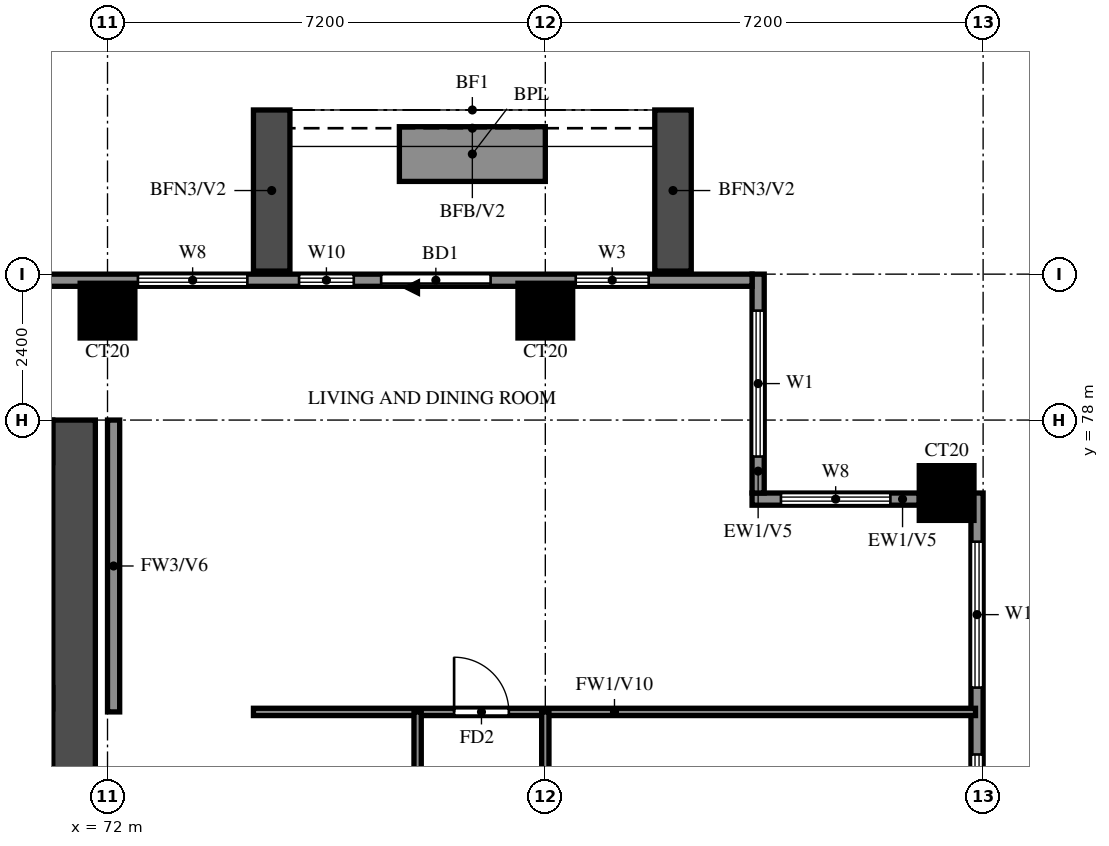
"""IFC4 building model, lengths in metres.
Left out: names, types, materials, properties, quantities, classifications, styles, units other than length and angle.
Written with IfcOpenShell. Run it as: python <this file> out.ifc"""

import sys

from ifc_helpers import new_model, si_unit, direction, frame, frame_2d, origin, origin_2d, place, context, subcontext, project, spatial, rectangle, extrude, source, transform, mapped, element, fill, save


model = new_model("IFC4")
c1 = context("Model", 3, precision=1e-05, world=origin(), true_north=direction((0.0, 1.0)))
c2 = subcontext(c1, "Body", "Model", "MODEL_VIEW")
j1 = project(units=[si_unit("LENGTHUNIT", "METRE"), si_unit("PLANEANGLEUNIT", "RADIAN")], contexts=[c1])
p1 = place(None, origin())
s1 = spatial("IfcSite", under=j1, at=p1, CompositionType="ELEMENT")
p2 = place(p1, origin())
s2 = spatial("IfcBuilding", under=s1, at=p2, CompositionType="ELEMENT")
p3 = place(p2, frame((0.0, 0.0, 134.0)))
s3 = spatial("IfcBuildingStorey", under=s2, at=p3, CompositionType="ELEMENT", Elevation=134.0)
m1 = source(origin(), c2, "Body", "SweptSolid", [
    extrude(rectangle(XDim=0.9, YDim=0.9, at=origin_2d()), origin(), (0.0, 0.0, 1.0), 3.15),
])
for number, where, z_axis, x_axis in (
    (1, (85.8, 76.8, 0.0), (0.0, 0.0, 1.0), (1.0, 0.0, 0.0)),
    (2, (72.0, 79.8, 0.0), (0.0, 0.0, 1.0), (1.0, 0.0, 0.0)),
    (3, (79.2, 79.8, 0.0), (0.0, 0.0, 1.0), (1.0, 0.0, 0.0)),
):
    element("IfcColumn", number, at=place(p3, frame(where, z_axis=z_axis, x_axis=x_axis)), inside=s3, PredefinedType="COLUMN", context=c2, shape_type="MappedRepresentation", body=[
        mapped(m1, transform((0.0, 0.0, 0.0))),
    ])
p4 = place(p3, frame((71.45, 66.1, 0.0), z_axis=(0.0, 0.0, 1.0), x_axis=(0.0, 1.0, 0.0)))
e4 = element("IfcWall", 4, at=p4, inside=s3, PredefinedType="SHEAR", context=c2, shape_type="SweptSolid", body=[
    extrude(rectangle(XDim=11.9, YDim=0.7, at=frame_2d((5.95, 0.0))), origin(), (0.0, 0.0, 1.0), 3.15),
])
p5 = place(p3, frame((29.7, 77.65, 0.0), z_axis=(0.0, 0.0, 1.0), x_axis=(1.0, 0.0, 0.0)))
e5 = element("IfcWall", 5, at=p5, inside=s3, PredefinedType="SHEAR", context=c2, shape_type="SweptSolid", body=[
    extrude(rectangle(XDim=41.4, YDim=0.7, at=frame_2d((20.7, 0.0))), origin(), (0.0, 0.0, 1.0), 3.15),
])
p6 = place(p3, frame((86.3, 69.6, 0.0), z_axis=(0.0, 0.0, 1.0), x_axis=(0.0, 1.0, 0.0)))
e6 = element("IfcWall", 6, at=p6, inside=s3, PredefinedType="SOLIDWALL", context=c2, shape_type="SweptSolid", body=[
    extrude(rectangle(XDim=7.2, YDim=0.2, at=frame_2d((3.6, 0.0))), origin(), (0.0, 0.0, 1.0), 3.15),
])
p7 = place(p6, frame((1.1, 0.0, 0.6)))
e7 = element("IfcOpeningElement", 7, at=p7, cuts=e6, PredefinedType="OPENING", context=c2, shape_type="SweptSolid", body=[
    extrude(rectangle(XDim=1.8, YDim=2.4, at=frame_2d((0.9, 1.2))), frame((0.0, 0.11, 0.0), z_axis=(0.0, -1.0, 0.0), x_axis=(1.0, 0.0, 0.0)), (0.0, 0.0, 1.0), 0.22),
])
p8 = place(p6, frame((4.0, 0.0, 0.6)))
e8 = element("IfcOpeningElement", 8, at=p8, cuts=e6, PredefinedType="OPENING", context=c2, shape_type="SweptSolid", body=[
    extrude(rectangle(XDim=2.4, YDim=2.4, at=frame_2d((1.2, 1.2))), frame((0.0, 0.11, 0.0), z_axis=(0.0, -1.0, 0.0), x_axis=(1.0, 0.0, 0.0)), (0.0, 0.0, 1.0), 0.22),
])
p9 = place(p3, frame((85.35, 76.7, 0.0), z_axis=(0.0, 0.0, 1.0), x_axis=(-1.0, 0.0, 0.0)))
e9 = element("IfcWall", 9, at=p9, inside=s3, PredefinedType="SOLIDWALL", context=c2, shape_type="SweptSolid", body=[
    extrude(rectangle(XDim=2.75, YDim=0.2, at=frame_2d((1.375, 0.0))), origin(), (0.0, 0.0, 1.0), 3.15),
])
p10 = place(p9, frame((0.475, 0.0, 0.6)))
e10 = element("IfcOpeningElement", 10, at=p10, cuts=e9, PredefinedType="OPENING", context=c2, shape_type="SweptSolid", body=[
    extrude(rectangle(XDim=1.8, YDim=2.4, at=frame_2d((0.9, 1.2))), frame((0.0, 0.11, 0.0), z_axis=(0.0, -1.0, 0.0), x_axis=(1.0, 0.0, 0.0)), (0.0, 0.0, 1.0), 0.22),
])
p11 = place(p3, frame((82.7, 76.8, 0.0), z_axis=(0.0, 0.0, 1.0), x_axis=(0.0, 1.0, 0.0)))
e11 = element("IfcWall", 11, at=p11, inside=s3, PredefinedType="SOLIDWALL", context=c2, shape_type="SweptSolid", body=[
    extrude(rectangle(XDim=3.6, YDim=0.2, at=frame_2d((1.8, 0.0))), origin(), (0.0, 0.0, 1.0), 3.15),
])
p12 = place(p11, frame((0.6, 0.0, 0.6)))
e12 = element("IfcOpeningElement", 12, at=p12, cuts=e11, PredefinedType="OPENING", context=c2, shape_type="SweptSolid", body=[
    extrude(rectangle(XDim=2.4, YDim=2.4, at=frame_2d((1.2, 1.2))), frame((0.0, 0.11, 0.0), z_axis=(0.0, -1.0, 0.0), x_axis=(1.0, 0.0, 0.0)), (0.0, 0.0, 1.0), 0.22),
])
p13 = place(p3, frame((82.6, 80.3, 0.0), z_axis=(0.0, 0.0, 1.0), x_axis=(-1.0, 0.0, 0.0)))
e13 = element("IfcWall", 13, at=p13, inside=s3, PredefinedType="SOLIDWALL", context=c2, shape_type="SweptSolid", body=[
    extrude(rectangle(XDim=64.6, YDim=0.2, at=frame_2d((32.3, 0.0))), origin(), (0.0, 0.0, 1.0), 3.15),
])
p14 = place(p13, frame((4.3, 0.0, 0.0)))
e14 = element("IfcOpeningElement", 14, at=p14, cuts=e13, PredefinedType="OPENING", context=c2, shape_type="SweptSolid", body=[
    extrude(rectangle(XDim=1.8, YDim=2.4, at=frame_2d((0.9, 1.2))), frame((0.0, 0.11, 0.0), z_axis=(0.0, -1.0, 0.0), x_axis=(1.0, 0.0, 0.0)), (0.0, 0.0, 1.0), 0.22),
])
p15 = place(p13, frame((54.767, 0.0, 0.6)))
e15 = element("IfcOpeningElement", 15, at=p15, cuts=e13, PredefinedType="OPENING", context=c2, shape_type="SweptSolid", body=[
    extrude(rectangle(XDim=2.4, YDim=2.4, at=frame_2d((1.2, 1.2))), frame((0.0, 0.11, 0.0), z_axis=(0.0, -1.0, 0.0), x_axis=(1.0, 0.0, 0.0)), (0.0, 0.0, 1.0), 0.22),
])
p16 = place(p13, frame((57.633, 0.0, 0.6)))
e16 = element("IfcOpeningElement", 16, at=p16, cuts=e13, PredefinedType="OPENING", context=c2, shape_type="SweptSolid", body=[
    extrude(rectangle(XDim=2.4, YDim=2.4, at=frame_2d((1.2, 1.2))), frame((0.0, 0.11, 0.0), z_axis=(0.0, -1.0, 0.0), x_axis=(1.0, 0.0, 0.0)), (0.0, 0.0, 1.0), 0.22),
])
p17 = place(p13, frame((62.0, 0.0, 0.6)))
e17 = element("IfcOpeningElement", 17, at=p17, cuts=e13, PredefinedType="OPENING", context=c2, shape_type="SweptSolid", body=[
    extrude(rectangle(XDim=1.8, YDim=2.4, at=frame_2d((0.9, 1.2))), frame((0.0, 0.11, 0.0), z_axis=(0.0, -1.0, 0.0), x_axis=(1.0, 0.0, 0.0)), (0.0, 0.0, 1.0), 0.22),
])
p18 = place(p13, frame((1.7, 0.0, 0.6)))
e18 = element("IfcOpeningElement", 18, at=p18, cuts=e13, PredefinedType="OPENING", context=c2, shape_type="SweptSolid", body=[
    extrude(rectangle(XDim=1.2, YDim=2.4, at=frame_2d((0.6, 1.2))), frame((0.0, 0.11, 0.0), z_axis=(0.0, -1.0, 0.0), x_axis=(1.0, 0.0, 0.0)), (0.0, 0.0, 1.0), 0.22),
])
p19 = place(p13, frame((6.55, 0.0, 0.6)))
e19 = element("IfcOpeningElement", 19, at=p19, cuts=e13, PredefinedType="OPENING", context=c2, shape_type="SweptSolid", body=[
    extrude(rectangle(XDim=0.9, YDim=2.4, at=frame_2d((0.45, 1.2))), frame((0.0, 0.11, 0.0), z_axis=(0.0, -1.0, 0.0), x_axis=(1.0, 0.0, 0.0)), (0.0, 0.0, 1.0), 0.22),
])
p20 = place(p13, frame((8.3, 0.0, 0.6)))
e20 = element("IfcOpeningElement", 20, at=p20, cuts=e13, PredefinedType="OPENING", context=c2, shape_type="SweptSolid", body=[
    extrude(rectangle(XDim=1.8, YDim=2.4, at=frame_2d((0.9, 1.2))), frame((0.0, 0.11, 0.0), z_axis=(0.0, -1.0, 0.0), x_axis=(1.0, 0.0, 0.0)), (0.0, 0.0, 1.0), 0.22),
])
for number, where, z_axis, x_axis in (
    (21, (81.3, 80.45, 0.0), (0.0, 0.0, 1.0), (0.0, 1.0, 0.0)),
    (22, (74.7, 80.45, 0.0), (0.0, 0.0, 1.0), (0.0, 1.0, 0.0)),
):
    element("IfcWall", number, at=place(p3, frame(where, z_axis=z_axis, x_axis=x_axis)), inside=s3, PredefinedType="SOLIDWALL", context=c2, shape_type="SweptSolid", body=[
        extrude(rectangle(XDim=2.65, YDim=0.6, at=frame_2d((1.325, 0.0))), origin(), (0.0, 0.0, 1.0), 2.8),
    ])
p21 = place(p3, frame((79.2, 82.375, 0.0), z_axis=(0.0, 0.0, 1.0), x_axis=(-1.0, 0.0, 0.0)))
e23 = element("IfcWall", 23, at=p21, inside=s3, PredefinedType="SOLIDWALL", context=c2, shape_type="SweptSolid", body=[
    extrude(rectangle(XDim=2.4, YDim=0.9, at=frame_2d((1.2, 0.0))), origin(), (0.0, 0.0, 1.0), 0.9),
])
p22 = place(p3, frame((72.1, 73.2, 0.0), z_axis=(0.0, 0.0, 1.0), x_axis=(0.0, 1.0, 0.0)))
e24 = element("IfcWall", 24, at=p22, inside=s3, PredefinedType="SOLIDWALL", context=c2, shape_type="SweptSolid", body=[
    extrude(rectangle(XDim=4.8, YDim=0.2, at=frame_2d((2.4, 0.0))), origin(), (0.0, 0.0, 1.0), 3.15),
])
p23 = place(p3, frame((74.4, 73.2, 0.0), z_axis=(0.0, 0.0, 1.0), x_axis=(1.0, 0.0, 0.0)))
e25 = element("IfcWall", 25, at=p23, inside=s3, PredefinedType="PARTITIONING", context=c2, shape_type="SweptSolid", body=[
    extrude(rectangle(XDim=11.875, YDim=0.12, at=frame_2d((5.938, 0.0))), origin(), (0.0, 0.0, 1.0), 2.25),
])
p24 = place(p23, frame((3.3, 0.0, 0.0)))
e26 = element("IfcOpeningElement", 26, at=p24, cuts=e25, PredefinedType="OPENING", context=c2, shape_type="SweptSolid", body=[
    extrude(rectangle(XDim=0.9, YDim=2.1, at=frame_2d((0.45, 1.05))), frame((0.0, 0.07, 0.0), z_axis=(0.0, -1.0, 0.0), x_axis=(1.0, 0.0, 0.0)), (0.0, 0.0, 1.0), 0.14),
])
p25 = place(p3, frame((77.1, 64.8, 0.0), z_axis=(0.0, 0.0, 1.0), x_axis=(0.0, 1.0, 0.0)))
e27 = element("IfcWall", 27, at=p25, inside=s3, PredefinedType="PARTITIONING", context=c2, shape_type="SweptSolid", body=[
    extrude(rectangle(XDim=8.4, YDim=0.12, at=frame_2d((4.2, 0.0))), origin(), (0.0, 0.0, 1.0), 3.15),
])
p26 = place(p25, frame((1.875, 0.0, 0.0)))
e28 = element("IfcOpeningElement", 28, at=p26, cuts=e27, PredefinedType="OPENING", context=c2, shape_type="SweptSolid", body=[
    extrude(rectangle(XDim=0.9, YDim=2.1, at=frame_2d((0.45, 1.05))), frame((0.0, 0.07, 0.0), z_axis=(0.0, -1.0, 0.0), x_axis=(1.0, 0.0, 0.0)), (0.0, 0.0, 1.0), 0.14),
])
p27 = place(p25, frame((6.075, 0.0, 0.0)))
e29 = element("IfcOpeningElement", 29, at=p27, cuts=e27, PredefinedType="OPENING", context=c2, shape_type="SweptSolid", body=[
    extrude(rectangle(XDim=0.9, YDim=2.1, at=frame_2d((0.45, 1.05))), frame((0.0, 0.07, 0.0), z_axis=(0.0, -1.0, 0.0), x_axis=(1.0, 0.0, 0.0)), (0.0, 0.0, 1.0), 0.14),
])
p28 = place(p3, frame((79.2, 69.6, 0.0), z_axis=(0.0, 0.0, 1.0), x_axis=(0.0, 1.0, 0.0)))
e30 = element("IfcWall", 30, at=p28, inside=s3, PredefinedType="PARTITIONING", context=c2, shape_type="SweptSolid", body=[
    extrude(rectangle(XDim=3.6, YDim=0.12, at=frame_2d((1.8, 0.0))), origin(), (0.0, 0.0, 1.0), 3.15),
])
p29 = place(p28, frame((1.35, 0.0, 0.0)))
e31 = element("IfcOpeningElement", 31, at=p29, cuts=e30, PredefinedType="OPENING", context=c2, shape_type="SweptSolid", body=[
    extrude(rectangle(XDim=0.9, YDim=2.1, at=frame_2d((0.45, 1.05))), frame((0.0, 0.07, 0.0), z_axis=(0.0, -1.0, 0.0), x_axis=(1.0, 0.0, 0.0)), (0.0, 0.0, 1.0), 0.14),
])
p30 = place(p7, origin())
e32 = element("IfcWindow", 32, at=p30, inside=s3, PartitioningType="DOUBLE_PANEL_VERTICAL", PredefinedType="WINDOW", context=c2, shape_type="SweptSolid", body=[
    extrude(rectangle(XDim=1.8, YDim=2.4, at=frame_2d((0.9, 1.2))), frame((0.0, 0.03, 0.0), z_axis=(0.0, -1.0, 0.0), x_axis=(1.0, 0.0, 0.0)), (0.0, 0.0, 1.0), 0.06),
])
fill(e7, e32)
p31 = place(p8, origin())
e33 = element("IfcWindow", 33, at=p31, inside=s3, PartitioningType="DOUBLE_PANEL_VERTICAL", PredefinedType="WINDOW", context=c2, shape_type="SweptSolid", body=[
    extrude(rectangle(XDim=2.4, YDim=2.4, at=frame_2d((1.2, 1.2))), frame((0.0, 0.03, 0.0), z_axis=(0.0, -1.0, 0.0), x_axis=(1.0, 0.0, 0.0)), (0.0, 0.0, 1.0), 0.06),
])
fill(e8, e33)
p32 = place(p10, origin())
e34 = element("IfcWindow", 34, at=p32, inside=s3, PartitioningType="DOUBLE_PANEL_VERTICAL", PredefinedType="WINDOW", context=c2, shape_type="SweptSolid", body=[
    extrude(rectangle(XDim=1.8, YDim=2.4, at=frame_2d((0.9, 1.2))), frame((0.0, 0.03, 0.0), z_axis=(0.0, -1.0, 0.0), x_axis=(1.0, 0.0, 0.0)), (0.0, 0.0, 1.0), 0.06),
])
fill(e10, e34)
p33 = place(p12, origin())
e35 = element("IfcWindow", 35, at=p33, inside=s3, PartitioningType="DOUBLE_PANEL_VERTICAL", PredefinedType="WINDOW", context=c2, shape_type="SweptSolid", body=[
    extrude(rectangle(XDim=2.4, YDim=2.4, at=frame_2d((1.2, 1.2))), frame((0.0, 0.03, 0.0), z_axis=(0.0, -1.0, 0.0), x_axis=(1.0, 0.0, 0.0)), (0.0, 0.0, 1.0), 0.06),
])
fill(e12, e35)
p34 = place(p14, origin())
e36 = element("IfcDoor", 36, at=p34, inside=s3, OperationType="DOUBLE_DOOR_SLIDING", PredefinedType="DOOR", context=c2, shape_type="SweptSolid", body=[
    extrude(rectangle(XDim=1.8, YDim=2.4, at=frame_2d((0.9, 1.2))), frame((0.0, 0.025, 0.0), z_axis=(0.0, -1.0, 0.0), x_axis=(1.0, 0.0, 0.0)), (0.0, 0.0, 1.0), 0.05),
])
fill(e14, e36)
p35 = place(p18, origin())
e37 = element("IfcWindow", 37, at=p35, inside=s3, PartitioningType="SINGLE_PANEL", PredefinedType="WINDOW", context=c2, shape_type="SweptSolid", body=[
    extrude(rectangle(XDim=1.2, YDim=2.4, at=frame_2d((0.6, 1.2))), frame((0.0, 0.03, 0.0), z_axis=(0.0, -1.0, 0.0), x_axis=(1.0, 0.0, 0.0)), (0.0, 0.0, 1.0), 0.06),
])
fill(e18, e37)
p36 = place(p19, origin())
e38 = element("IfcWindow", 38, at=p36, inside=s3, PartitioningType="SINGLE_PANEL", PredefinedType="WINDOW", context=c2, shape_type="SweptSolid", body=[
    extrude(rectangle(XDim=0.9, YDim=2.4, at=frame_2d((0.45, 1.2))), frame((0.0, 0.03, 0.0), z_axis=(0.0, -1.0, 0.0), x_axis=(1.0, 0.0, 0.0)), (0.0, 0.0, 1.0), 0.06),
])
fill(e19, e38)
p37 = place(p20, origin())
e39 = element("IfcWindow", 39, at=p37, inside=s3, PartitioningType="DOUBLE_PANEL_VERTICAL", PredefinedType="WINDOW", context=c2, shape_type="SweptSolid", body=[
    extrude(rectangle(XDim=1.8, YDim=2.4, at=frame_2d((0.9, 1.2))), frame((0.0, 0.03, 0.0), z_axis=(0.0, -1.0, 0.0), x_axis=(1.0, 0.0, 0.0)), (0.0, 0.0, 1.0), 0.06),
])
fill(e20, e39)
p38 = place(p24, origin())
e40 = element("IfcDoor", 40, at=p38, inside=s3, OperationType="SINGLE_SWING_LEFT", PredefinedType="DOOR", context=c2, shape_type="SweptSolid", body=[
    extrude(rectangle(XDim=0.9, YDim=2.1, at=frame_2d((0.45, 1.05))), frame((0.0, 0.025, 0.0), z_axis=(0.0, -1.0, 0.0), x_axis=(1.0, 0.0, 0.0)), (0.0, 0.0, 1.0), 0.05),
])
fill(e26, e40)
save(model, sys.argv[1])
